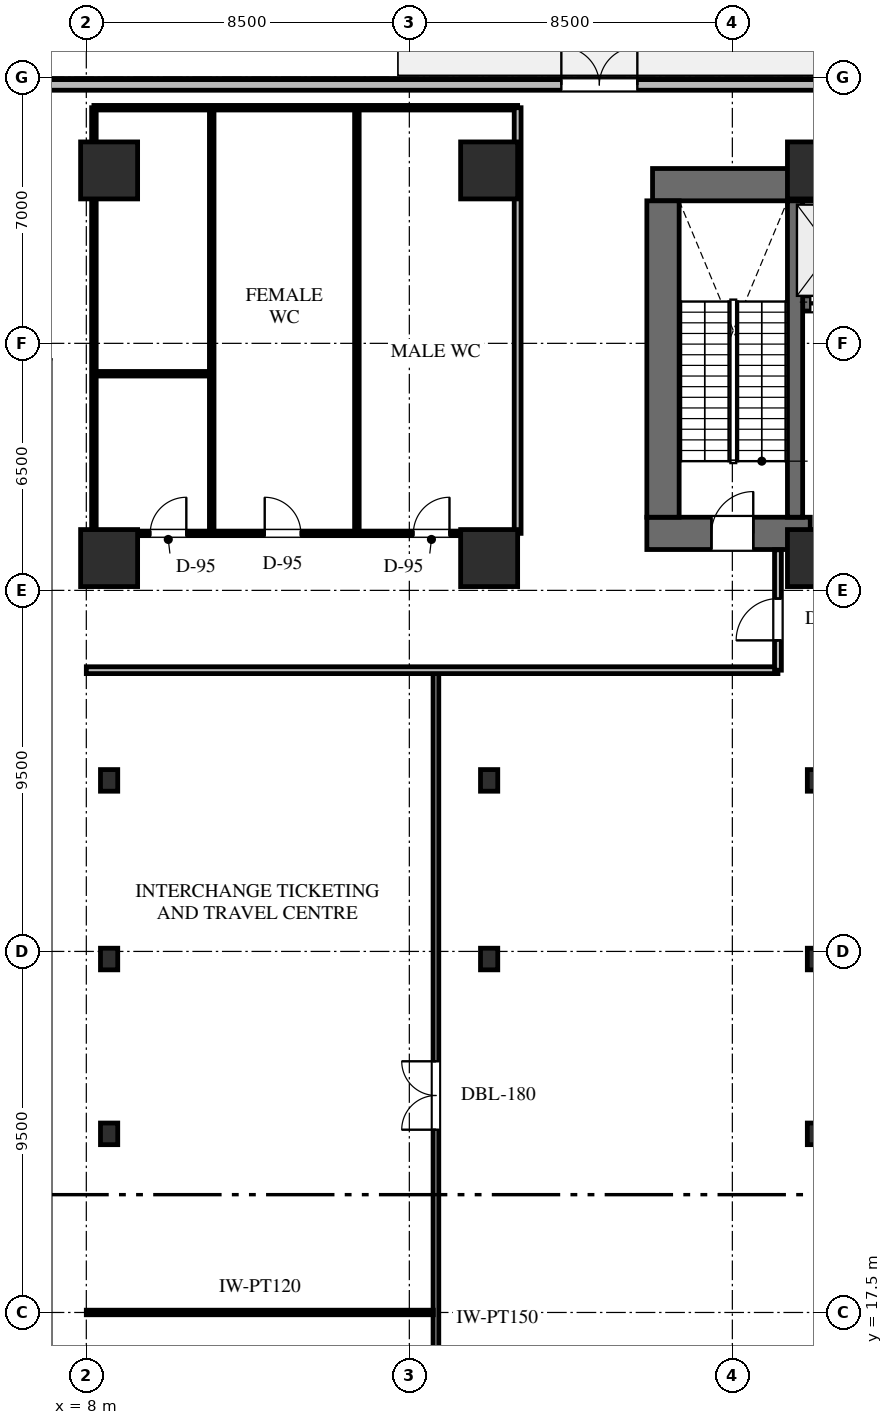
"""IFC4 building model, lengths in metres.
Left out: names, types, materials, properties, quantities, classifications, styles, units other than length and angle.
Written with IfcOpenShell. Run it as: python <this file> out.ifc"""

import sys

from ifc_helpers import new_model, si_unit, direction, frame, frame_2d, origin, origin_2d, place, context, subcontext, project, spatial, rectangle, i_section, extrude, element, fill, save


model = new_model("IFC4")
c1 = context("Model", 3, precision=1e-05, world=origin(), true_north=direction((0.0, 1.0)))
c2 = subcontext(c1, "Body", "Model", "MODEL_VIEW")
j1 = project(units=[si_unit("LENGTHUNIT", "METRE"), si_unit("PLANEANGLEUNIT", "RADIAN")], contexts=[c1])
p1 = place(None, origin())
s1 = spatial("IfcSite", under=j1, at=p1, CompositionType="ELEMENT")
p2 = place(p1, origin())
s2 = spatial("IfcBuilding", under=s1, at=p2, CompositionType="ELEMENT")
p3 = place(p2, origin())
s3 = spatial("IfcBuildingStorey", under=s2, at=p3, CompositionType="ELEMENT", Elevation=0.0)
p4 = place(p3, frame((22.9, 47.175, 0.0), z_axis=(0.0, 0.0, 1.0), x_axis=(1.0, 0.0, 0.0)))
e1 = element("IfcWall", 1, at=p4, inside=s3, PredefinedType="SHEAR", context=c2, shape_type="SweptSolid", body=[
    extrude(rectangle(XDim=43.8, YDim=0.85, at=frame_2d((21.9, 0.0))), origin(), (0.0, 0.0, 1.0), 5.4),
])
p5 = place(p3, frame((26.85, 44.05, 0.0), z_axis=(0.0, 0.0, 1.0), x_axis=(1.0, 0.0, 0.0)))
e2 = element("IfcWall", 2, at=p5, inside=s3, PredefinedType="SHEAR", context=c2, shape_type="SweptSolid", body=[
    extrude(rectangle(XDim=7.95, YDim=0.4, at=frame_2d((3.975, 0.0))), origin(), (0.0, 0.0, 1.0), 5.4),
])
p6 = place(p5, frame((0.2, 0.0, 0.0)))
e3 = element("IfcOpeningElement", 3, at=p6, cuts=e2, PredefinedType="OPENING", context=c2, shape_type="SweptSolid", body=[
    extrude(rectangle(XDim=1.1, YDim=2.2, at=frame_2d((0.55, 1.1))), frame((0.0, 0.21, 0.0), z_axis=(0.0, -1.0, 0.0), x_axis=(1.0, 0.0, 0.0)), (0.0, 0.0, 1.0), 0.42),
])
p7 = place(p5, frame((2.2, 0.0, 0.0)))
e4 = element("IfcOpeningElement", 4, at=p7, cuts=e2, PredefinedType="OPENING", context=c2, shape_type="SweptSolid", body=[
    extrude(rectangle(XDim=1.1, YDim=2.2, at=frame_2d((0.55, 1.1))), frame((0.0, 0.21, 0.0), z_axis=(0.0, -1.0, 0.0), x_axis=(1.0, 0.0, 0.0)), (0.0, 0.0, 1.0), 0.42),
])
p8 = place(p5, frame((4.2, 0.0, 0.0)))
e5 = element("IfcOpeningElement", 5, at=p8, cuts=e2, PredefinedType="OPENING", context=c2, shape_type="SweptSolid", body=[
    extrude(rectangle(XDim=1.1, YDim=2.2, at=frame_2d((0.55, 1.1))), frame((0.0, 0.21, 0.0), z_axis=(0.0, -1.0, 0.0), x_axis=(1.0, 0.0, 0.0)), (0.0, 0.0, 1.0), 0.42),
])
p9 = place(p5, frame((6.2, 0.0, 0.0)))
e6 = element("IfcOpeningElement", 6, at=p9, cuts=e2, PredefinedType="OPENING", context=c2, shape_type="SweptSolid", body=[
    extrude(rectangle(XDim=1.1, YDim=2.2, at=frame_2d((0.55, 1.1))), frame((0.0, 0.21, 0.0), z_axis=(0.0, -1.0, 0.0), x_axis=(1.0, 0.0, 0.0)), (0.0, 0.0, 1.0), 0.42),
])
p10 = place(p3, frame((22.75, 38.0, 0.0), z_axis=(0.0, 0.0, 1.0), x_axis=(1.0, 0.0, 0.0)))
e7 = element("IfcWall", 7, at=p10, inside=s3, PredefinedType="SHEAR", context=c2, shape_type="SweptSolid", body=[
    extrude(rectangle(XDim=4.3, YDim=0.85, at=frame_2d((2.15, 0.0))), origin(), (0.0, 0.0, 1.0), 5.4),
])
p11 = place(p10, frame((1.7, 0.0, 0.0)))
e8 = element("IfcOpeningElement", 8, at=p11, cuts=e7, PredefinedType="OPENING", context=c2, shape_type="SweptSolid", body=[
    extrude(rectangle(XDim=1.1, YDim=2.2, at=frame_2d((0.55, 1.1))), frame((0.0, 0.435, 0.0), z_axis=(0.0, -1.0, 0.0), x_axis=(1.0, 0.0, 0.0)), (0.0, 0.0, 1.0), 0.87),
])
p12 = place(p3, frame((23.175, 38.425, 0.0), z_axis=(0.0, 0.0, 1.0), x_axis=(0.0, 1.0, 0.0)))
e9 = element("IfcWall", 9, at=p12, inside=s3, PredefinedType="SHEAR", context=c2, shape_type="SweptSolid", body=[
    extrude(rectangle(XDim=8.325, YDim=0.85, at=frame_2d((4.163, 0.0))), origin(), (0.0, 0.0, 1.0), 5.4),
])
p13 = place(p3, frame((26.65, 38.425, 0.0), z_axis=(0.0, 0.0, 1.0), x_axis=(0.0, 1.0, 0.0)))
e10 = element("IfcWall", 10, at=p13, inside=s3, PredefinedType="SHEAR", context=c2, shape_type="SweptSolid", body=[
    extrude(rectangle(XDim=8.325, YDim=0.4, at=frame_2d((4.163, 0.0))), origin(), (0.0, 0.0, 1.0), 5.4),
])
for number, where, z_axis, x_axis in (
    (11, (8.6, 22.2, 0.0), (0.0, 0.0, 1.0), (1.0, 0.0, 0.0)),
    (12, (27.2, 22.2, 0.0), (0.0, 0.0, 1.0), (1.0, 0.0, 0.0)),
    (13, (8.6, 26.8, 0.0), (0.0, 0.0, 1.0), (1.0, 0.0, 0.0)),
    (14, (18.6, 26.8, 0.0), (0.0, 0.0, 1.0), (1.0, 0.0, 0.0)),
    (15, (27.2, 26.8, 0.0), (0.0, 0.0, 1.0), (1.0, 0.0, 0.0)),
    (16, (8.6, 31.5, 0.0), (0.0, 0.0, 1.0), (1.0, 0.0, 0.0)),
    (17, (18.6, 31.5, 0.0), (0.0, 0.0, 1.0), (1.0, 0.0, 0.0)),
    (18, (27.2, 31.5, 0.0), (0.0, 0.0, 1.0), (1.0, 0.0, 0.0)),
):
    element("IfcColumn", number, at=place(p3, frame(where, z_axis=z_axis, x_axis=x_axis)), inside=s3, PredefinedType="COLUMN", context=c2, shape_type="SweptSolid", body=[
        extrude(i_section(OverallWidth=0.454, OverallDepth=0.569, WebThickness=0.078, FlangeThickness=0.125, FilletRadius=0.03, at=origin_2d()), origin(), (0.0, 0.0, 1.0), 5.4),
    ])
for number, where, z_axis, x_axis in (
    (19, (27.2, 37.35, 0.0), (0.0, 0.0, 1.0), (1.0, 0.0, 0.0)),
    (20, (27.2, 47.55, 0.0), (0.0, 0.0, 1.0), (1.0, 0.0, 0.0)),
    (21, (18.6, 37.35, 0.0), (0.0, 0.0, 1.0), (1.0, 0.0, 0.0)),
    (22, (18.6, 47.55, 0.0), (0.0, 0.0, 1.0), (1.0, 0.0, 0.0)),
    (23, (8.6, 37.35, 0.0), (0.0, 0.0, 1.0), (1.0, 0.0, 0.0)),
    (24, (8.6, 47.55, 0.0), (0.0, 0.0, 1.0), (1.0, 0.0, 0.0)),
):
    element("IfcColumn", number, at=place(p3, frame(where, z_axis=z_axis, x_axis=x_axis)), inside=s3, PredefinedType="COLUMN", context=c2, shape_type="SweptSolid", body=[
        extrude(rectangle(XDim=1.5, YDim=1.5, at=origin_2d()), origin(), (0.0, 0.0, 1.0), 5.4),
    ])
p14 = place(p3, frame((0.4, 49.8, 0.0), z_axis=(0.0, 0.0, 1.0), x_axis=(1.0, 0.0, 0.0)))
e25 = element("IfcWall", 25, at=p14, inside=s3, PredefinedType="STANDARD", context=c2, shape_type="SweptSolid", body=[
    extrude(rectangle(XDim=73.2, YDim=0.28, at=frame_2d((36.6, 0.0))), origin(), (0.0, 0.0, 1.0), 5.13),
])
p15 = place(p14, frame((20.1, 0.0, 0.0)))
e26 = element("IfcOpeningElement", 26, at=p15, cuts=e25, PredefinedType="OPENING", context=c2, shape_type="SweptSolid", body=[
    extrude(rectangle(XDim=2.0, YDim=2.4, at=frame_2d((1.0, 1.2))), frame((0.0, 0.15, 0.0), z_axis=(0.0, -1.0, 0.0), x_axis=(1.0, 0.0, 0.0)), (0.0, 0.0, 1.0), 0.3),
])
p16 = place(p14, frame((68.2, 0.0, 0.0)))
e27 = element("IfcOpeningElement", 27, at=p16, cuts=e25, PredefinedType="OPENING", context=c2, shape_type="SweptSolid", body=[
    extrude(rectangle(XDim=2.0, YDim=2.4, at=frame_2d((1.0, 1.2))), frame((0.0, 0.15, 0.0), z_axis=(0.0, -1.0, 0.0), x_axis=(1.0, 0.0, 0.0)), (0.0, 0.0, 1.0), 0.3),
])
p17 = place(p14, frame((3.5, 0.0, 0.0)))
e28 = element("IfcOpeningElement", 28, at=p17, cuts=e25, PredefinedType="OPENING", context=c2, shape_type="SweptSolid", body=[
    extrude(rectangle(XDim=2.4, YDim=2.4, at=frame_2d((1.2, 1.2))), frame((0.0, 0.15, 0.0), z_axis=(0.0, -1.0, 0.0), x_axis=(1.0, 0.0, 0.0)), (0.0, 0.0, 1.0), 0.3),
])
p18 = place(p3, frame((27.05, 38.0, 0.0), z_axis=(0.0, 0.0, 1.0), x_axis=(1.0, 0.0, 0.0)))
e29 = element("IfcWall", 29, at=p18, inside=s3, PredefinedType="STANDARD", context=c2, shape_type="SweptSolid", body=[
    extrude(rectangle(XDim=7.95, YDim=0.18, at=frame_2d((3.975, 0.0))), origin(), (0.0, 0.0, 1.0), 4.182),
])
p19 = place(p18, frame((2.25, 0.0, 0.0)))
e30 = element("IfcOpeningElement", 30, at=p19, cuts=e29, PredefinedType="OPENING", context=c2, shape_type="SweptSolid", body=[
    extrude(rectangle(XDim=1.8, YDim=2.2, at=frame_2d((0.9, 1.1))), frame((0.0, 0.1, 0.0), z_axis=(0.0, -1.0, 0.0), x_axis=(1.0, 0.0, 0.0)), (0.0, 0.0, 1.0), 0.2),
])
p20 = place(p3, frame((17.2, 0.365, 0.0), z_axis=(0.0, 0.0, 1.0), x_axis=(0.0, 1.0, 0.0)))
e31 = element("IfcWall", 31, at=p20, inside=s3, PredefinedType="PARTITIONING", context=c2, shape_type="SweptSolid", body=[
    extrude(rectangle(XDim=33.967, YDim=0.15, at=frame_2d((16.983, 0.0))), origin(), (0.0, 0.0, 1.0), 4.182),
])
p21 = place(p20, frame((7.735, 0.0, 0.0)))
e32 = element("IfcOpeningElement", 32, at=p21, cuts=e31, PredefinedType="OPENING", context=c2, shape_type="SweptSolid", body=[
    extrude(rectangle(XDim=1.8, YDim=2.2, at=frame_2d((0.9, 1.1))), frame((0.0, 0.085, 0.0), z_axis=(0.0, -1.0, 0.0), x_axis=(1.0, 0.0, 0.0)), (0.0, 0.0, 1.0), 0.17),
])
p22 = place(p20, frame((21.944, 0.0, 0.0)))
e33 = element("IfcOpeningElement", 33, at=p22, cuts=e31, PredefinedType="OPENING", context=c2, shape_type="SweptSolid", body=[
    extrude(rectangle(XDim=1.8, YDim=2.2, at=frame_2d((0.9, 1.1))), frame((0.0, 0.085, 0.0), z_axis=(0.0, -1.0, 0.0), x_axis=(1.0, 0.0, 0.0)), (0.0, 0.0, 1.0), 0.17),
])
p23 = place(p3, frame((8.0, 17.5, 0.0), z_axis=(0.0, 0.0, 1.0), x_axis=(1.0, 0.0, 0.0)))
e34 = element("IfcWall", 34, at=p23, inside=s3, PredefinedType="PARTITIONING", context=c2, shape_type="SweptSolid", body=[
    extrude(rectangle(XDim=9.132, YDim=0.12, at=frame_2d((4.566, 0.0))), origin(), (0.0, 0.0, 1.0), 4.182),
])
p24 = place(p3, frame((8.0, 34.4, 0.0), z_axis=(0.0, 0.0, 1.0), x_axis=(1.0, 0.0, 0.0)))
e35 = element("IfcWall", 35, at=p24, inside=s3, PredefinedType="STANDARD", context=c2, shape_type="SweptSolid", body=[
    extrude(rectangle(XDim=18.2, YDim=0.18, at=frame_2d((9.1, 0.0))), origin(), (0.0, 0.0, 1.0), 4.182),
])
p25 = place(p3, frame((26.2, 34.4, 0.0), z_axis=(0.0, 0.0, 1.0), x_axis=(0.0, 1.0, 0.0)))
e36 = element("IfcWall", 36, at=p25, inside=s3, PredefinedType="STANDARD", context=c2, shape_type="SweptSolid", body=[
    extrude(rectangle(XDim=3.167, YDim=0.18, at=frame_2d((1.583, 0.0))), origin(), (0.0, 0.0, 1.0), 4.182),
])
p26 = place(p25, frame((0.785, 0.0, 0.0)))
e37 = element("IfcOpeningElement", 37, at=p26, cuts=e36, PredefinedType="OPENING", context=c2, shape_type="SweptSolid", body=[
    extrude(rectangle(XDim=1.1, YDim=2.2, at=frame_2d((0.55, 1.1))), frame((0.0, 0.1, 0.0), z_axis=(0.0, -1.0, 0.0), x_axis=(1.0, 0.0, 0.0)), (0.0, 0.0, 1.0), 0.2),
])
p27 = place(p3, frame((8.2, 38.0, 0.0), z_axis=(0.0, 0.0, 1.0), x_axis=(1.0, 0.0, 0.0)))
e38 = element("IfcWall", 38, at=p27, inside=s3, PredefinedType="PARTITIONING", context=c2, shape_type="SweptSolid", body=[
    extrude(rectangle(XDim=11.15, YDim=0.12, at=frame_2d((5.575, 0.0))), origin(), (0.0, 0.0, 1.0), 4.182),
])
p28 = place(p27, frame((1.482, 0.0, 0.0)))
e39 = element("IfcOpeningElement", 39, at=p28, cuts=e38, PredefinedType="OPENING", context=c2, shape_type="SweptSolid", body=[
    extrude(rectangle(XDim=0.95, YDim=2.15, at=frame_2d((0.475, 1.075))), frame((0.0, 0.07, 0.0), z_axis=(0.0, -1.0, 0.0), x_axis=(1.0, 0.0, 0.0)), (0.0, 0.0, 1.0), 0.14),
])
p29 = place(p27, frame((4.494, 0.0, 0.0)))
e40 = element("IfcOpeningElement", 40, at=p29, cuts=e38, PredefinedType="OPENING", context=c2, shape_type="SweptSolid", body=[
    extrude(rectangle(XDim=0.95, YDim=2.15, at=frame_2d((0.475, 1.075))), frame((0.0, 0.07, 0.0), z_axis=(0.0, -1.0, 0.0), x_axis=(1.0, 0.0, 0.0)), (0.0, 0.0, 1.0), 0.14),
])
p30 = place(p27, frame((8.407, 0.0, 0.0)))
e41 = element("IfcOpeningElement", 41, at=p30, cuts=e38, PredefinedType="OPENING", context=c2, shape_type="SweptSolid", body=[
    extrude(rectangle(XDim=0.95, YDim=2.15, at=frame_2d((0.475, 1.075))), frame((0.0, 0.07, 0.0), z_axis=(0.0, -1.0, 0.0), x_axis=(1.0, 0.0, 0.0)), (0.0, 0.0, 1.0), 0.14),
])
p31 = place(p3, frame((8.2, 38.0, 0.0), z_axis=(0.0, 0.0, 1.0), x_axis=(0.0, 1.0, 0.0)))
e42 = element("IfcWall", 42, at=p31, inside=s3, PredefinedType="PARTITIONING", context=c2, shape_type="SweptSolid", body=[
    extrude(rectangle(XDim=11.2, YDim=0.12, at=frame_2d((5.6, 0.0))), origin(), (0.0, 0.0, 1.0), 5.13),
])
p32 = place(p3, frame((8.2, 49.2, 0.0), z_axis=(0.0, 0.0, 1.0), x_axis=(1.0, 0.0, 0.0)))
e43 = element("IfcWall", 43, at=p32, inside=s3, PredefinedType="PARTITIONING", context=c2, shape_type="SweptSolid", body=[
    extrude(rectangle(XDim=11.15, YDim=0.12, at=frame_2d((5.575, 0.0))), origin(), (0.0, 0.0, 1.0), 5.13),
])
p33 = place(p3, frame((19.35, 38.0, 0.0), z_axis=(0.0, 0.0, 1.0), x_axis=(0.0, 1.0, 0.0)))
e44 = element("IfcWall", 44, at=p33, inside=s3, PredefinedType="STANDARD", context=c2, shape_type="SweptSolid", body=[
    extrude(rectangle(XDim=11.2, YDim=0.18, at=frame_2d((5.6, 0.0))), origin(), (0.0, 0.0, 1.0), 5.13),
])
for number, where, z_axis, x_axis in (
    (45, (11.3, 38.068, 0.0), (0.0, 0.0, 1.0), (0.0, 1.0, 0.0)),
    (46, (15.12, 38.068, 0.0), (0.0, 0.0, 1.0), (0.0, 1.0, 0.0)),
):
    element("IfcWall", number, at=place(p3, frame(where, z_axis=z_axis, x_axis=x_axis)), inside=s3, PredefinedType="PARTITIONING", context=c2, shape_type="SweptSolid", body=[
        extrude(rectangle(XDim=11.064, YDim=0.12, at=frame_2d((5.532, 0.0))), origin(), (0.0, 0.0, 1.0), 4.182),
    ])
p34 = place(p3, frame((8.268, 42.2, 0.0), z_axis=(0.0, 0.0, 1.0), x_axis=(1.0, 0.0, 0.0)))
e47 = element("IfcWall", 47, at=p34, inside=s3, PredefinedType="PARTITIONING", context=c2, shape_type="SweptSolid", body=[
    extrude(rectangle(XDim=2.964, YDim=0.12, at=frame_2d((1.482, 0.0))), origin(), (0.0, 0.0, 1.0), 4.182),
])
p35 = place(p15, origin())
e48 = element("IfcDoor", 48, at=p35, inside=s3, OperationType="DOUBLE_DOOR_SINGLE_SWING", PredefinedType="DOOR", context=c2, shape_type="SweptSolid", body=[
    extrude(rectangle(XDim=2.0, YDim=2.4, at=frame_2d((1.0, 1.2))), frame((0.0, 0.025, 0.0), z_axis=(0.0, -1.0, 0.0), x_axis=(1.0, 0.0, 0.0)), (0.0, 0.0, 1.0), 0.05),
])
fill(e26, e48)
p36 = place(p11, origin())
e49 = element("IfcDoor", 49, at=p36, inside=s3, OperationType="SINGLE_SWING_RIGHT", PredefinedType="DOOR", context=c2, shape_type="SweptSolid", body=[
    extrude(rectangle(XDim=1.1, YDim=2.2, at=frame_2d((0.55, 1.1))), frame((0.0, 0.025, 0.0), z_axis=(0.0, -1.0, 0.0), x_axis=(1.0, 0.0, 0.0)), (0.0, 0.0, 1.0), 0.05),
])
fill(e8, e49)
p37 = place(p6, origin())
e50 = element("IfcDoor", 50, at=p37, inside=s3, OperationType="DOUBLE_DOOR_SLIDING", PredefinedType="DOOR", context=c2, shape_type="SweptSolid", body=[
    extrude(rectangle(XDim=1.1, YDim=2.2, at=frame_2d((0.55, 1.1))), frame((0.0, 0.025, 0.0), z_axis=(0.0, -1.0, 0.0), x_axis=(1.0, 0.0, 0.0)), (0.0, 0.0, 1.0), 0.05),
])
fill(e3, e50)
p38 = place(p26, origin())
e51 = element("IfcDoor", 51, at=p38, inside=s3, OperationType="SINGLE_SWING_LEFT", PredefinedType="DOOR", context=c2, shape_type="SweptSolid", body=[
    extrude(rectangle(XDim=1.1, YDim=2.2, at=frame_2d((0.55, 1.1))), frame((0.0, 0.025, 0.0), z_axis=(0.0, -1.0, 0.0), x_axis=(1.0, 0.0, 0.0)), (0.0, 0.0, 1.0), 0.05),
])
fill(e37, e51)
p39 = place(p22, origin())
e52 = element("IfcDoor", 52, at=p39, inside=s3, OperationType="DOUBLE_DOOR_SINGLE_SWING", PredefinedType="DOOR", context=c2, shape_type="SweptSolid", body=[
    extrude(rectangle(XDim=1.8, YDim=2.2, at=frame_2d((0.9, 1.1))), frame((0.0, 0.025, 0.0), z_axis=(0.0, -1.0, 0.0), x_axis=(1.0, 0.0, 0.0)), (0.0, 0.0, 1.0), 0.05),
])
fill(e33, e52)
p40 = place(p28, origin())
e53 = element("IfcDoor", 53, at=p40, inside=s3, OperationType="SINGLE_SWING_RIGHT", PredefinedType="DOOR", context=c2, shape_type="SweptSolid", body=[
    extrude(rectangle(XDim=0.95, YDim=2.15, at=frame_2d((0.475, 1.075))), frame((0.0, 0.025, 0.0), z_axis=(0.0, -1.0, 0.0), x_axis=(1.0, 0.0, 0.0)), (0.0, 0.0, 1.0), 0.05),
])
fill(e39, e53)
p41 = place(p29, origin())
e54 = element("IfcDoor", 54, at=p41, inside=s3, OperationType="SINGLE_SWING_LEFT", PredefinedType="DOOR", context=c2, shape_type="SweptSolid", body=[
    extrude(rectangle(XDim=0.95, YDim=2.15, at=frame_2d((0.475, 1.075))), frame((0.0, 0.025, 0.0), z_axis=(0.0, -1.0, 0.0), x_axis=(1.0, 0.0, 0.0)), (0.0, 0.0, 1.0), 0.05),
])
fill(e40, e54)
p42 = place(p30, origin())
e55 = element("IfcDoor", 55, at=p42, inside=s3, OperationType="SINGLE_SWING_RIGHT", PredefinedType="DOOR", context=c2, shape_type="SweptSolid", body=[
    extrude(rectangle(XDim=0.95, YDim=2.15, at=frame_2d((0.475, 1.075))), frame((0.0, 0.025, 0.0), z_axis=(0.0, -1.0, 0.0), x_axis=(1.0, 0.0, 0.0)), (0.0, 0.0, 1.0), 0.05),
])
fill(e41, e55)
save(model, sys.argv[1])
